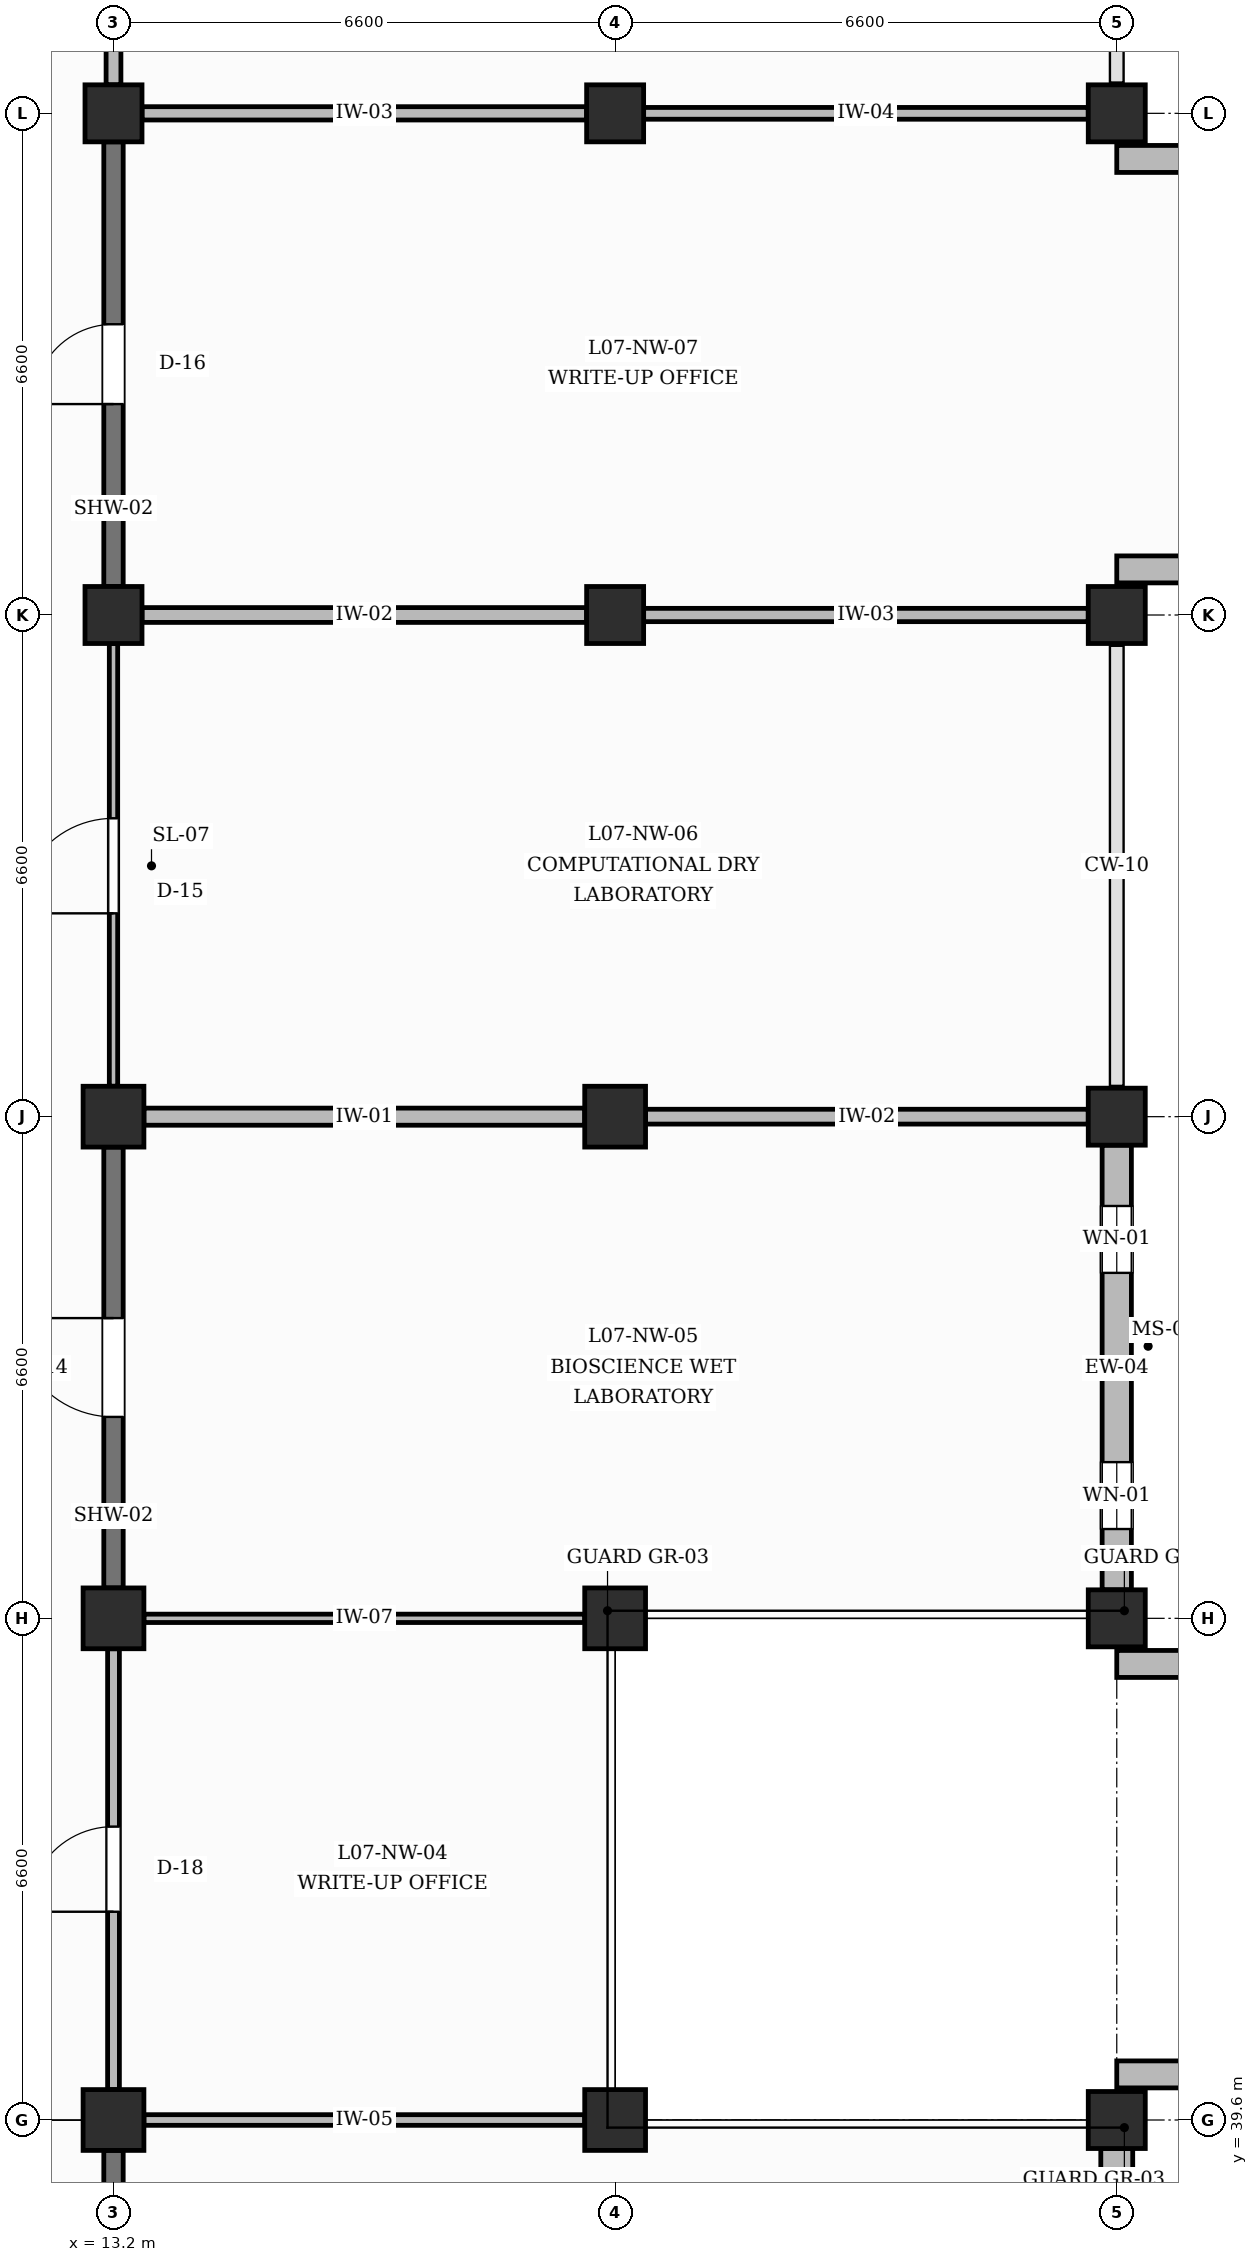
"""IFC4 building model, lengths in metres.
Left out: names, types, materials, properties, quantities, classifications, styles, units other than length and angle.
Written with IfcOpenShell. Run it as: python <this file> out.ifc"""

import sys

from ifc_helpers import new_model, si_unit, direction, frame, frame_2d, origin, origin_2d, place, context, subcontext, project, spatial, rectangle, extrude, element, fill, save


model = new_model("IFC4")
c1 = context("Model", 3, precision=1e-05, world=origin(), true_north=direction((0.0, 1.0)))
c2 = subcontext(c1, "Body", "Model", "MODEL_VIEW")
j1 = project(units=[si_unit("LENGTHUNIT", "METRE"), si_unit("PLANEANGLEUNIT", "RADIAN")], contexts=[c1])
p1 = place(None, origin())
s1 = spatial("IfcSite", under=j1, at=p1, CompositionType="ELEMENT")
p2 = place(p1, origin())
s2 = spatial("IfcBuilding", under=s1, at=p2, CompositionType="ELEMENT")
p3 = place(p2, frame((0.0, 0.0, 31.2)))
s3 = spatial("IfcBuildingStorey", under=s2, at=p3, CompositionType="ELEMENT", Elevation=31.2)
for number, where, z_axis, x_axis in (
    (1, (13.2, 39.6, 0.0), (0.0, 0.0, 1.0), (1.0, 0.0, 0.0)),
    (2, (13.2, 46.2, 0.0), (0.0, 0.0, 1.0), (1.0, 0.0, 0.0)),
    (3, (13.2, 52.8, 0.0), (0.0, 0.0, 1.0), (1.0, 0.0, 0.0)),
):
    element("IfcColumn", number, at=place(p3, frame(where, z_axis=z_axis, x_axis=x_axis)), inside=s3, PredefinedType="COLUMN", context=c2, shape_type="SweptSolid", body=[
        extrude(rectangle(XDim=0.8, YDim=0.8, at=origin_2d()), origin(), (0.0, 0.0, 1.0), 4.2),
    ])
for number, where, z_axis, x_axis in (
    (4, (13.2, 59.4, 0.0), (0.0, 0.0, 1.0), (1.0, 0.0, 0.0)),
    (5, (13.2, 66.0, 0.0), (0.0, 0.0, 1.0), (1.0, 0.0, 0.0)),
):
    element("IfcColumn", number, at=place(p3, frame(where, z_axis=z_axis, x_axis=x_axis)), inside=s3, PredefinedType="COLUMN", context=c2, shape_type="SweptSolid", body=[
        extrude(rectangle(XDim=0.75, YDim=0.75, at=origin_2d()), origin(), (0.0, 0.0, 1.0), 4.2),
    ])
for number, where, z_axis, x_axis in (
    (6, (19.8, 39.6, 0.0), (0.0, 0.0, 1.0), (1.0, 0.0, 0.0)),
    (7, (19.8, 46.2, 0.0), (0.0, 0.0, 1.0), (1.0, 0.0, 0.0)),
    (8, (19.8, 52.8, 0.0), (0.0, 0.0, 1.0), (1.0, 0.0, 0.0)),
):
    element("IfcColumn", number, at=place(p3, frame(where, z_axis=z_axis, x_axis=x_axis)), inside=s3, PredefinedType="COLUMN", context=c2, shape_type="SweptSolid", body=[
        extrude(rectangle(XDim=0.8, YDim=0.8, at=origin_2d()), origin(), (0.0, 0.0, 1.0), 4.2),
    ])
for number, where, z_axis, x_axis in (
    (9, (19.8, 59.4, 0.0), (0.0, 0.0, 1.0), (1.0, 0.0, 0.0)),
    (10, (19.8, 66.0, 0.0), (0.0, 0.0, 1.0), (1.0, 0.0, 0.0)),
    (11, (26.4, 39.6, 0.0), (0.0, 0.0, 1.0), (1.0, 0.0, 0.0)),
    (12, (26.4, 46.2, 0.0), (0.0, 0.0, 1.0), (1.0, 0.0, 0.0)),
    (13, (26.4, 52.8, 0.0), (0.0, 0.0, 1.0), (1.0, 0.0, 0.0)),
    (14, (26.4, 59.4, 0.0), (0.0, 0.0, 1.0), (1.0, 0.0, 0.0)),
    (15, (26.4, 66.0, 0.0), (0.0, 0.0, 1.0), (1.0, 0.0, 0.0)),
):
    element("IfcColumn", number, at=place(p3, frame(where, z_axis=z_axis, x_axis=x_axis)), inside=s3, PredefinedType="COLUMN", context=c2, shape_type="SweptSolid", body=[
        extrude(rectangle(XDim=0.75, YDim=0.75, at=origin_2d()), origin(), (0.0, 0.0, 1.0), 4.2),
    ])
p4 = place(p3, frame((26.4, 33.375, 0.0), z_axis=(0.0, 0.0, 1.0), x_axis=(0.0, 1.0, 0.0)))
e16 = element("IfcWall", 16, at=p4, inside=s3, PredefinedType="SOLIDWALL", context=c2, shape_type="SweptSolid", body=[
    extrude(rectangle(XDim=5.85, YDim=0.42, at=frame_2d((2.925, 0.0))), origin(), (0.0, 0.0, 1.0), 3.28),
])
p5 = place(p4, frame((1.715, 0.0, 0.95)))
e17 = element("IfcOpeningElement", 17, at=p5, cuts=e16, PredefinedType="OPENING", context=c2, shape_type="SweptSolid", body=[
    extrude(rectangle(XDim=2.42, YDim=1.68, at=frame_2d((1.21, 0.84))), frame((0.0, 0.22, 0.0), z_axis=(0.0, -1.0, 0.0), x_axis=(1.0, 0.0, 0.0)), (0.0, 0.0, 1.0), 0.44),
])
for number, where, z_axis, x_axis in (
    (18, (26.4, 40.2, 0.0), (0.0, 0.0, 1.0), (1.0, 0.0, 0.0)),
    (19, (26.4, 45.6, 0.0), (0.0, 0.0, 1.0), (1.0, 0.0, 0.0)),
):
    element("IfcWall", number, at=place(p3, frame(where, z_axis=z_axis, x_axis=x_axis)), inside=s3, PredefinedType="SOLIDWALL", context=c2, shape_type="SweptSolid", body=[
        extrude(rectangle(XDim=2.0, YDim=0.355, at=frame_2d((1.0, 0.0))), origin(), (0.0, 0.0, 1.0), 3.28),
    ])
p6 = place(p3, frame((26.4, 46.575, 0.0), z_axis=(0.0, 0.0, 1.0), x_axis=(0.0, 1.0, 0.0)))
e20 = element("IfcWall", 20, at=p6, inside=s3, PredefinedType="SOLIDWALL", context=c2, shape_type="SweptSolid", body=[
    extrude(rectangle(XDim=5.85, YDim=0.385, at=frame_2d((2.925, 0.0))), origin(), (0.0, 0.0, 1.0), 3.28),
])
p7 = place(p6, frame((0.8, 0.0, 0.95)))
e21 = element("IfcOpeningElement", 21, at=p7, cuts=e20, PredefinedType="OPENING", context=c2, shape_type="SweptSolid", body=[
    extrude(rectangle(XDim=0.88, YDim=1.3, at=frame_2d((0.44, 0.65))), frame((0.0, 0.202, 0.0), z_axis=(0.0, -1.0, 0.0), x_axis=(1.0, 0.0, 0.0)), (0.0, 0.0, 1.0), 0.405),
])
p8 = place(p6, frame((4.17, 0.0, 0.95)))
e22 = element("IfcOpeningElement", 22, at=p8, cuts=e20, PredefinedType="OPENING", context=c2, shape_type="SweptSolid", body=[
    extrude(rectangle(XDim=0.88, YDim=1.3, at=frame_2d((0.44, 0.65))), frame((0.0, 0.202, 0.0), z_axis=(0.0, -1.0, 0.0), x_axis=(1.0, 0.0, 0.0)), (0.0, 0.0, 1.0), 0.405),
])
for number, where, z_axis, x_axis in (
    (23, (26.4, 60.0, 0.0), (0.0, 0.0, 1.0), (1.0, 0.0, 0.0)),
    (24, (26.4, 65.4, 0.0), (0.0, 0.0, 1.0), (1.0, 0.0, 0.0)),
):
    element("IfcWall", number, at=place(p3, frame(where, z_axis=z_axis, x_axis=x_axis)), inside=s3, PredefinedType="SOLIDWALL", context=c2, shape_type="SweptSolid", body=[
        extrude(rectangle(XDim=2.0, YDim=0.355, at=frame_2d((1.0, 0.0))), origin(), (0.0, 0.0, 1.0), 3.28),
    ])
p9 = place(p3, frame((13.2, 33.4, 0.0), z_axis=(0.0, 0.0, 1.0), x_axis=(0.0, 1.0, 0.0)))
e25 = element("IfcWall", 25, at=p9, inside=s3, PredefinedType="SHEAR", context=c2, shape_type="SweptSolid", body=[
    extrude(rectangle(XDim=5.8, YDim=0.255, at=frame_2d((2.9, 0.0))), origin(), (0.0, 0.0, 1.0), 3.18),
])
p10 = place(p9, frame((2.2, 0.0, 0.0)))
e26 = element("IfcOpeningElement", 26, at=p10, cuts=e25, PredefinedType="OPENING", context=c2, shape_type="SweptSolid", body=[
    extrude(rectangle(XDim=1.4, YDim=2.25, at=frame_2d((0.7, 1.125))), frame((0.0, 0.137, 0.0), z_axis=(0.0, -1.0, 0.0), x_axis=(1.0, 0.0, 0.0)), (0.0, 0.0, 1.0), 0.275),
])
p11 = place(p3, frame((13.2, 40.0, 0.0), z_axis=(0.0, 0.0, 1.0), x_axis=(0.0, 1.0, 0.0)))
e27 = element("IfcWall", 27, at=p11, inside=s3, PredefinedType="PARTITIONING", context=c2, shape_type="SweptSolid", body=[
    extrude(rectangle(XDim=5.8, YDim=0.155, at=frame_2d((2.9, 0.0))), origin(), (0.0, 0.0, 1.0), 3.18),
])
p12 = place(p11, frame((2.34, 0.0, 0.0)))
e28 = element("IfcOpeningElement", 28, at=p12, cuts=e27, PredefinedType="OPENING", context=c2, shape_type="SweptSolid", body=[
    extrude(rectangle(XDim=1.12, YDim=2.2, at=frame_2d((0.56, 1.1))), frame((0.0, 0.087, 0.0), z_axis=(0.0, -1.0, 0.0), x_axis=(1.0, 0.0, 0.0)), (0.0, 0.0, 1.0), 0.175),
])
p13 = place(p3, frame((13.2, 46.6, 0.0), z_axis=(0.0, 0.0, 1.0), x_axis=(0.0, 1.0, 0.0)))
e29 = element("IfcWall", 29, at=p13, inside=s3, PredefinedType="SHEAR", context=c2, shape_type="SweptSolid", body=[
    extrude(rectangle(XDim=5.8, YDim=0.255, at=frame_2d((2.9, 0.0))), origin(), (0.0, 0.0, 1.0), 3.18),
])
p14 = place(p13, frame((2.25, 0.0, 0.0)))
e30 = element("IfcOpeningElement", 30, at=p14, cuts=e29, PredefinedType="OPENING", context=c2, shape_type="SweptSolid", body=[
    extrude(rectangle(XDim=1.3, YDim=2.3, at=frame_2d((0.65, 1.15))), frame((0.0, 0.137, 0.0), z_axis=(0.0, -1.0, 0.0), x_axis=(1.0, 0.0, 0.0)), (0.0, 0.0, 1.0), 0.275),
])
p15 = place(p3, frame((13.2, 53.2, 0.0), z_axis=(0.0, 0.0, 1.0), x_axis=(0.0, 1.0, 0.0)))
e31 = element("IfcWall", 31, at=p15, inside=s3, PredefinedType="PARTITIONING", context=c2, shape_type="SweptSolid", body=[
    extrude(rectangle(XDim=5.825, YDim=0.11, at=frame_2d((2.913, 0.0))), origin(), (0.0, 0.0, 1.0), 3.18),
])
p16 = place(p15, frame((2.275, 0.0, 0.0)))
e32 = element("IfcOpeningElement", 32, at=p16, cuts=e31, PredefinedType="OPENING", context=c2, shape_type="SweptSolid", body=[
    extrude(rectangle(XDim=1.25, YDim=2.25, at=frame_2d((0.625, 1.125))), frame((0.0, 0.065, 0.0), z_axis=(0.0, -1.0, 0.0), x_axis=(1.0, 0.0, 0.0)), (0.0, 0.0, 1.0), 0.13),
])
p17 = place(p3, frame((13.2, 59.775, 0.0), z_axis=(0.0, 0.0, 1.0), x_axis=(0.0, 1.0, 0.0)))
e33 = element("IfcWall", 33, at=p17, inside=s3, PredefinedType="SHEAR", context=c2, shape_type="SweptSolid", body=[
    extrude(rectangle(XDim=5.85, YDim=0.255, at=frame_2d((2.925, 0.0))), origin(), (0.0, 0.0, 1.0), 3.18),
])
p18 = place(p17, frame((2.4, 0.0, 0.0)))
e34 = element("IfcOpeningElement", 34, at=p18, cuts=e33, PredefinedType="OPENING", context=c2, shape_type="SweptSolid", body=[
    extrude(rectangle(XDim=1.05, YDim=2.15, at=frame_2d((0.525, 1.075))), frame((0.0, 0.137, 0.0), z_axis=(0.0, -1.0, 0.0), x_axis=(1.0, 0.0, 0.0)), (0.0, 0.0, 1.0), 0.275),
])
p19 = place(p3, frame((13.2, 66.375, 0.0), z_axis=(0.0, 0.0, 1.0), x_axis=(0.0, 1.0, 0.0)))
e35 = element("IfcWall", 35, at=p19, inside=s3, PredefinedType="PARTITIONING", context=c2, shape_type="SweptSolid", body=[
    extrude(rectangle(XDim=5.85, YDim=0.195, at=frame_2d((2.925, 0.0))), origin(), (0.0, 0.0, 1.0), 3.18),
])
p20 = place(p19, frame((2.225, 0.0, 0.0)))
e36 = element("IfcOpeningElement", 36, at=p20, cuts=e35, PredefinedType="OPENING", context=c2, shape_type="SweptSolid", body=[
    extrude(rectangle(XDim=1.4, YDim=2.25, at=frame_2d((0.7, 1.125))), frame((0.0, 0.107, 0.0), z_axis=(0.0, -1.0, 0.0), x_axis=(1.0, 0.0, 0.0)), (0.0, 0.0, 1.0), 0.215),
])
p21 = place(p3, frame((13.6, 39.6, 0.0), z_axis=(0.0, 0.0, 1.0), x_axis=(1.0, 0.0, 0.0)))
e37 = element("IfcWall", 37, at=p21, inside=s3, PredefinedType="PARTITIONING", context=c2, shape_type="SweptSolid", body=[
    extrude(rectangle(XDim=5.8, YDim=0.14, at=frame_2d((2.9, 0.0))), origin(), (0.0, 0.0, 1.0), 3.18),
])
p22 = place(p3, frame((13.6, 46.2, 0.0), z_axis=(0.0, 0.0, 1.0), x_axis=(1.0, 0.0, 0.0)))
e38 = element("IfcWall", 38, at=p22, inside=s3, PredefinedType="PARTITIONING", context=c2, shape_type="SweptSolid", body=[
    extrude(rectangle(XDim=5.8, YDim=0.11, at=frame_2d((2.9, 0.0))), origin(), (0.0, 0.0, 1.0), 3.18),
])
p23 = place(p3, frame((13.6, 52.8, 0.0), z_axis=(0.0, 0.0, 1.0), x_axis=(1.0, 0.0, 0.0)))
e39 = element("IfcWall", 39, at=p23, inside=s3, PredefinedType="PARTITIONING", context=c2, shape_type="SweptSolid", body=[
    extrude(rectangle(XDim=5.8, YDim=0.225, at=frame_2d((2.9, 0.0))), origin(), (0.0, 0.0, 1.0), 3.18),
])
p24 = place(p3, frame((13.575, 59.4, 0.0), z_axis=(0.0, 0.0, 1.0), x_axis=(1.0, 0.0, 0.0)))
e40 = element("IfcWall", 40, at=p24, inside=s3, PredefinedType="PARTITIONING", context=c2, shape_type="SweptSolid", body=[
    extrude(rectangle(XDim=5.85, YDim=0.195, at=frame_2d((2.925, 0.0))), origin(), (0.0, 0.0, 1.0), 3.18),
])
p25 = place(p3, frame((13.575, 66.0, 0.0), z_axis=(0.0, 0.0, 1.0), x_axis=(1.0, 0.0, 0.0)))
e41 = element("IfcWall", 41, at=p25, inside=s3, PredefinedType="PARTITIONING", context=c2, shape_type="SweptSolid", body=[
    extrude(rectangle(XDim=5.85, YDim=0.175, at=frame_2d((2.925, 0.0))), origin(), (0.0, 0.0, 1.0), 3.18),
])
p26 = place(p3, frame((20.2, 52.8, 0.0), z_axis=(0.0, 0.0, 1.0), x_axis=(1.0, 0.0, 0.0)))
e42 = element("IfcWall", 42, at=p26, inside=s3, PredefinedType="PARTITIONING", context=c2, shape_type="SweptSolid", body=[
    extrude(rectangle(XDim=5.825, YDim=0.195, at=frame_2d((2.913, 0.0))), origin(), (0.0, 0.0, 1.0), 3.43),
])
p27 = place(p3, frame((20.175, 59.4, 0.0), z_axis=(0.0, 0.0, 1.0), x_axis=(1.0, 0.0, 0.0)))
e43 = element("IfcWall", 43, at=p27, inside=s3, PredefinedType="PARTITIONING", context=c2, shape_type="SweptSolid", body=[
    extrude(rectangle(XDim=5.85, YDim=0.175, at=frame_2d((2.925, 0.0))), origin(), (0.0, 0.0, 1.0), 3.43),
])
p28 = place(p3, frame((20.175, 66.0, 0.0), z_axis=(0.0, 0.0, 1.0), x_axis=(1.0, 0.0, 0.0)))
e44 = element("IfcWall", 44, at=p28, inside=s3, PredefinedType="PARTITIONING", context=c2, shape_type="SweptSolid", body=[
    extrude(rectangle(XDim=5.85, YDim=0.155, at=frame_2d((2.925, 0.0))), origin(), (0.0, 0.0, 1.0), 3.43),
])
p29 = place(p7, origin())
e45 = element("IfcWindow", 45, at=p29, inside=s3, PartitioningType="SINGLE_PANEL", PredefinedType="WINDOW", context=c2, shape_type="SweptSolid", body=[
    extrude(rectangle(XDim=0.88, YDim=1.3, at=frame_2d((0.44, 0.65))), frame((0.0, 0.03, 0.0), z_axis=(0.0, -1.0, 0.0), x_axis=(1.0, 0.0, 0.0)), (0.0, 0.0, 1.0), 0.06),
])
fill(e21, e45)
p30 = place(p8, origin())
e46 = element("IfcWindow", 46, at=p30, inside=s3, PartitioningType="SINGLE_PANEL", PredefinedType="WINDOW", context=c2, shape_type="SweptSolid", body=[
    extrude(rectangle(XDim=0.88, YDim=1.3, at=frame_2d((0.44, 0.65))), frame((0.0, 0.03, 0.0), z_axis=(0.0, -1.0, 0.0), x_axis=(1.0, 0.0, 0.0)), (0.0, 0.0, 1.0), 0.06),
])
fill(e22, e46)
p31 = place(p12, origin())
e47 = element("IfcDoor", 47, at=p31, inside=s3, OperationType="SINGLE_SWING_LEFT", PredefinedType="DOOR", context=c2, shape_type="SweptSolid", body=[
    extrude(rectangle(XDim=1.12, YDim=2.2, at=frame_2d((0.56, 1.1))), frame((0.0, 0.025, 0.0), z_axis=(0.0, -1.0, 0.0), x_axis=(1.0, 0.0, 0.0)), (0.0, 0.0, 1.0), 0.05),
])
fill(e28, e47)
p32 = place(p14, origin())
e48 = element("IfcDoor", 48, at=p32, inside=s3, OperationType="SINGLE_SWING_RIGHT", PredefinedType="DOOR", context=c2, shape_type="SweptSolid", body=[
    extrude(rectangle(XDim=1.3, YDim=2.3, at=frame_2d((0.65, 1.15))), frame((0.0, 0.025, 0.0), z_axis=(0.0, -1.0, 0.0), x_axis=(1.0, 0.0, 0.0)), (0.0, 0.0, 1.0), 0.05),
])
fill(e30, e48)
p33 = place(p16, origin())
e49 = element("IfcDoor", 49, at=p33, inside=s3, OperationType="SINGLE_SWING_LEFT", PredefinedType="DOOR", context=c2, shape_type="SweptSolid", body=[
    extrude(rectangle(XDim=1.25, YDim=2.25, at=frame_2d((0.625, 1.125))), frame((0.0, 0.025, 0.0), z_axis=(0.0, -1.0, 0.0), x_axis=(1.0, 0.0, 0.0)), (0.0, 0.0, 1.0), 0.05),
])
fill(e32, e49)
p34 = place(p18, origin())
e50 = element("IfcDoor", 50, at=p34, inside=s3, OperationType="SINGLE_SWING_LEFT", PredefinedType="DOOR", context=c2, shape_type="SweptSolid", body=[
    extrude(rectangle(XDim=1.05, YDim=2.15, at=frame_2d((0.525, 1.075))), frame((0.0, 0.025, 0.0), z_axis=(0.0, -1.0, 0.0), x_axis=(1.0, 0.0, 0.0)), (0.0, 0.0, 1.0), 0.05),
])
fill(e34, e50)
save(model, sys.argv[1])
